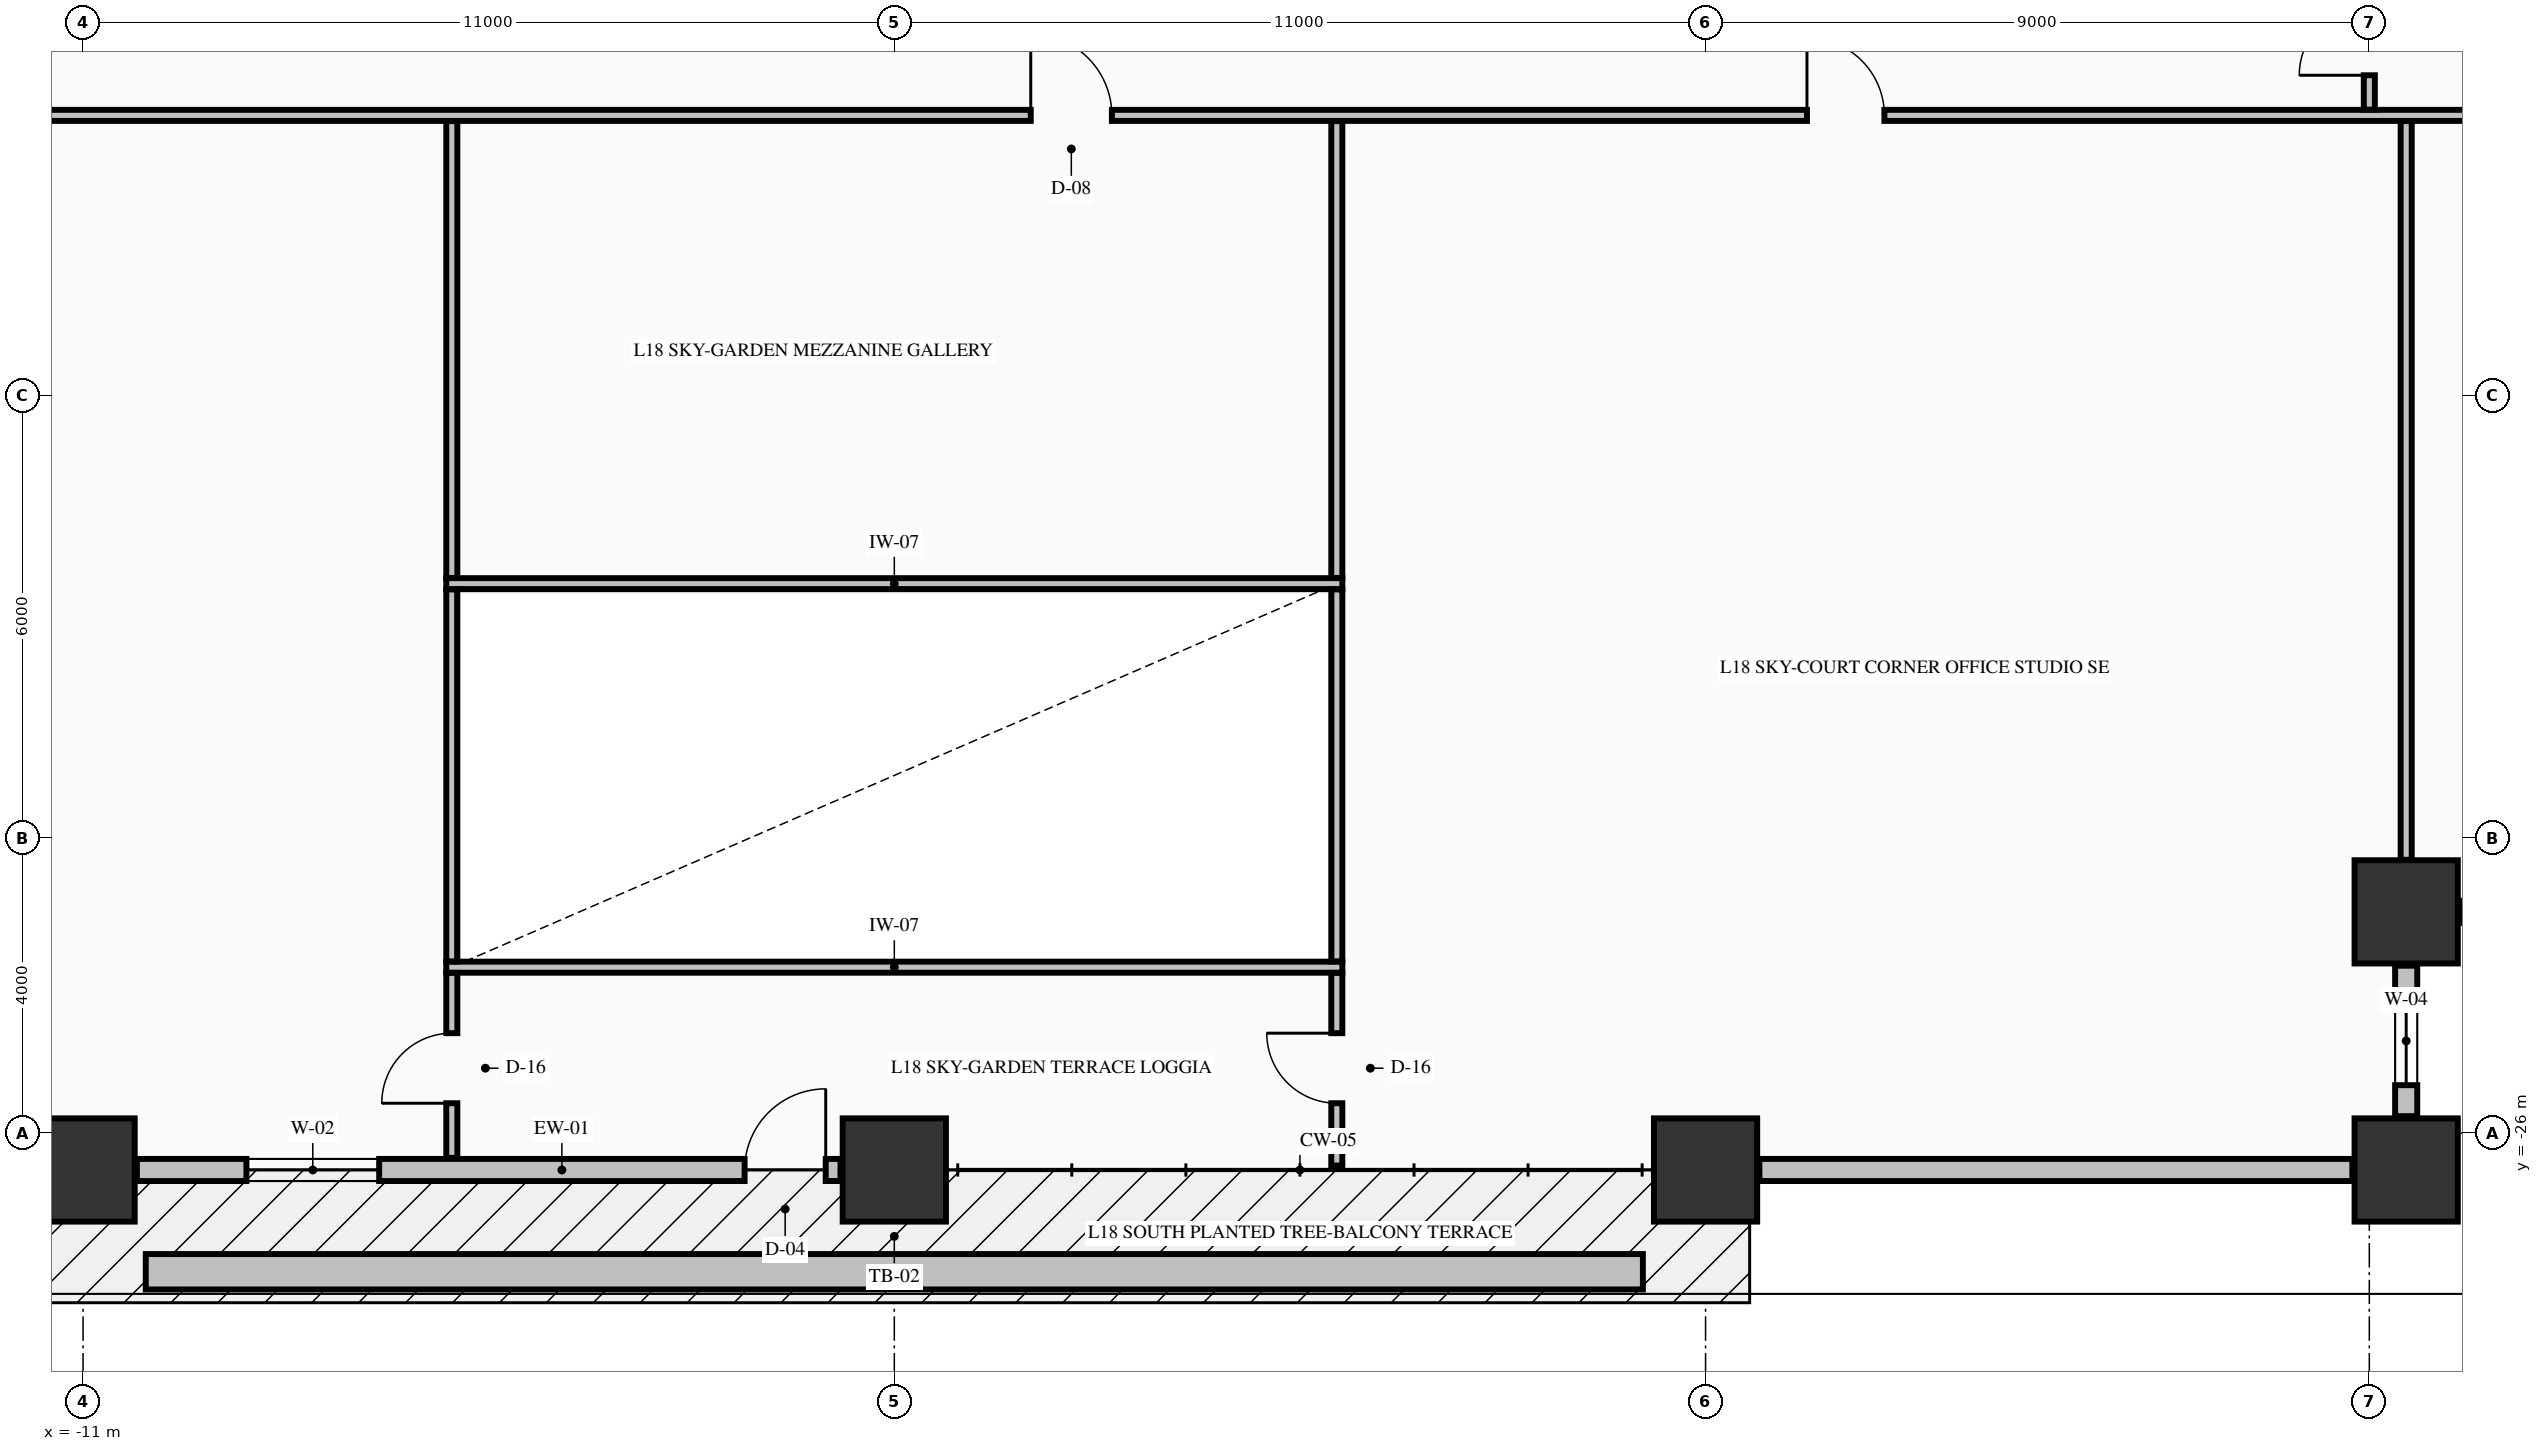
"""IFC4 building model, lengths in metres.
Left out: names, types, materials, properties, quantities, classifications, styles, units other than length and angle.
Written with IfcOpenShell. Run it as: python <this file> out.ifc"""

import sys

from ifc_helpers import new_model, si_unit, direction, frame, frame_2d, origin, origin_2d, place, context, subcontext, project, spatial, rectangle, extrude, element, fill, save


model = new_model("IFC4")
c1 = context("Model", 3, precision=1e-05, world=origin(), true_north=direction((0.0, 1.0)))
c2 = subcontext(c1, "Body", "Model", "MODEL_VIEW")
j1 = project(units=[si_unit("LENGTHUNIT", "METRE"), si_unit("PLANEANGLEUNIT", "RADIAN")], contexts=[c1])
p1 = place(None, origin())
s1 = spatial("IfcSite", under=j1, at=p1, CompositionType="ELEMENT")
p2 = place(p1, origin())
s2 = spatial("IfcBuilding", under=s1, at=p2, CompositionType="ELEMENT")
p3 = place(p2, frame((0.0, 0.0, 75.04)))
s3 = spatial("IfcBuildingStorey", under=s2, at=p3, CompositionType="ELEMENT", Elevation=75.04)
for number, where, z_axis, x_axis in (
    (1, (-11.0, -26.5, -0.25), (0.0, 0.0, 1.0), (1.0, 0.0, 0.0)),
    (2, (0.0, -26.5, -0.25), (0.0, 0.0, 1.0), (1.0, 0.0, 0.0)),
    (3, (11.0, -26.5, -0.25), (0.0, 0.0, 1.0), (1.0, 0.0, 0.0)),
    (4, (20.5, -26.5, -0.25), (0.0, 0.0, 1.0), (1.0, 0.0, 0.0)),
    (5, (20.5, -23.0, -0.25), (0.0, 0.0, 1.0), (1.0, 0.0, 0.0)),
):
    element("IfcColumn", number, at=place(p3, frame(where, z_axis=z_axis, x_axis=x_axis)), inside=s3, PredefinedType="COLUMN", context=c2, shape_type="SweptSolid", body=[
        extrude(rectangle(XDim=1.4, YDim=1.4, at=origin_2d()), origin(), (0.0, 0.0, 1.0), 3.57),
    ])
p4 = place(p3, frame((20.5, -25.77, 0.0), z_axis=(0.0, 0.0, 1.0), x_axis=(0.0, 1.0, 0.0)))
e6 = element("IfcWall", 6, at=p4, inside=s3, PredefinedType="STANDARD", context=c2, shape_type="SweptSolid", body=[
    extrude(rectangle(XDim=2.04, YDim=0.3, at=frame_2d((1.02, 0.0))), origin(), (0.0, 0.0, 1.0), 2.712),
])
p5 = place(p4, frame((0.42, 0.0, 0.82)))
e7 = element("IfcOpeningElement", 7, at=p5, cuts=e6, PredefinedType="OPENING", context=c2, shape_type="SweptSolid", body=[
    extrude(rectangle(XDim=1.2, YDim=1.65, at=frame_2d((0.6, 0.825))), frame((0.0, 0.16, 0.0), z_axis=(0.0, -1.0, 0.0), x_axis=(1.0, 0.0, 0.0)), (0.0, 0.0, 1.0), 0.32),
])
p6 = place(p3, frame((21.23, -23.0, 0.0), z_axis=(0.0, 0.0, 1.0), x_axis=(1.0, 0.0, 0.0)))
e8 = element("IfcWall", 8, at=p6, inside=s3, PredefinedType="STANDARD", context=c2, shape_type="SweptSolid", body=[
    extrude(rectangle(XDim=2.04, YDim=0.3, at=frame_2d((1.02, 0.0))), origin(), (0.0, 0.0, 1.0), 2.712),
])
p7 = place(p6, frame((0.42, 0.0, 0.82)))
e9 = element("IfcOpeningElement", 9, at=p7, cuts=e8, PredefinedType="OPENING", context=c2, shape_type="SweptSolid", body=[
    extrude(rectangle(XDim=1.2, YDim=1.65, at=frame_2d((0.6, 0.825))), frame((0.0, 0.16, 0.0), z_axis=(0.0, -1.0, 0.0), x_axis=(1.0, 0.0, 0.0)), (0.0, 0.0, 1.0), 0.32),
])
p8 = place(p3, frame((-10.27, -26.5, 0.0), z_axis=(0.0, 0.0, 1.0), x_axis=(1.0, 0.0, 0.0)))
e10 = element("IfcWall", 10, at=p8, inside=s3, PredefinedType="STANDARD", context=c2, shape_type="SweptSolid", body=[
    extrude(rectangle(XDim=9.54, YDim=0.3, at=frame_2d((4.77, 0.0))), origin(), (0.0, 0.0, 1.0), 2.712),
])
p9 = place(p8, frame((8.24, 0.0, 0.0)))
e11 = element("IfcOpeningElement", 11, at=p9, cuts=e10, PredefinedType="OPENING", context=c2, shape_type="SweptSolid", body=[
    extrude(rectangle(XDim=1.1, YDim=2.15, at=frame_2d((0.55, 1.075))), frame((0.0, 0.16, 0.0), z_axis=(0.0, -1.0, 0.0), x_axis=(1.0, 0.0, 0.0)), (0.0, 0.0, 1.0), 0.32),
])
p10 = place(p8, frame((1.485, 0.0, 0.78)))
e12 = element("IfcOpeningElement", 12, at=p10, cuts=e10, PredefinedType="OPENING", context=c2, shape_type="SweptSolid", body=[
    extrude(rectangle(XDim=1.8, YDim=1.72, at=frame_2d((0.9, 0.86))), frame((0.0, 0.16, 0.0), z_axis=(0.0, -1.0, 0.0), x_axis=(1.0, 0.0, 0.0)), (0.0, 0.0, 1.0), 0.32),
])
p11 = place(p3, frame((11.73, -26.5, 0.0), z_axis=(0.0, 0.0, 1.0), x_axis=(1.0, 0.0, 0.0)))
e13 = element("IfcWall", 13, at=p11, inside=s3, PredefinedType="STANDARD", context=c2, shape_type="SweptSolid", body=[
    extrude(rectangle(XDim=8.04, YDim=0.3, at=frame_2d((4.02, 0.0))), origin(), (0.0, 0.0, 1.0), 2.712),
])
for number, where, z_axis, x_axis in (
    (14, (-6.075, -23.75, 0.0), (0.0, 0.0, 1.0), (1.0, 0.0, 0.0)),
    (15, (-6.075, -18.55, 0.0), (0.0, 0.0, 1.0), (1.0, 0.0, 0.0)),
):
    element("IfcWall", number, at=place(p3, frame(where, z_axis=z_axis, x_axis=x_axis)), inside=s3, PredefinedType="PARTITIONING", context=c2, shape_type="SweptSolid", body=[
        extrude(rectangle(XDim=12.15, YDim=0.15, at=frame_2d((6.075, 0.0))), origin(), (0.0, 0.0, 1.0), 3.32),
    ])
p12 = place(p3, frame((-28.835, -12.2, 0.0), z_axis=(0.0, 0.0, 1.0), x_axis=(1.0, 0.0, 0.0)))
e16 = element("IfcWall", 16, at=p12, inside=s3, PredefinedType="PARTITIONING", context=c2, shape_type="SweptSolid", body=[
    extrude(rectangle(XDim=52.67, YDim=0.15, at=frame_2d((26.335, 0.0))), origin(), (0.0, 0.0, 1.0), 3.32),
])
p13 = place(p12, frame((30.685, 0.0, 0.0)))
e17 = element("IfcOpeningElement", 17, at=p13, cuts=e16, PredefinedType="OPENING", context=c2, shape_type="SweptSolid", body=[
    extrude(rectangle(XDim=1.1, YDim=2.15, at=frame_2d((0.55, 1.075))), frame((0.0, 0.085, 0.0), z_axis=(0.0, -1.0, 0.0), x_axis=(1.0, 0.0, 0.0)), (0.0, 0.0, 1.0), 0.17),
])
p14 = place(p12, frame((15.41, 0.0, 0.0)))
e18 = element("IfcOpeningElement", 18, at=p14, cuts=e16, PredefinedType="OPENING", context=c2, shape_type="SweptSolid", body=[
    extrude(rectangle(XDim=1.05, YDim=2.15, at=frame_2d((0.525, 1.075))), frame((0.0, 0.085, 0.0), z_axis=(0.0, -1.0, 0.0), x_axis=(1.0, 0.0, 0.0)), (0.0, 0.0, 1.0), 0.17),
])
p15 = place(p12, frame((41.21, 0.0, 0.0)))
e19 = element("IfcOpeningElement", 19, at=p15, cuts=e16, PredefinedType="OPENING", context=c2, shape_type="SweptSolid", body=[
    extrude(rectangle(XDim=1.05, YDim=2.15, at=frame_2d((0.525, 1.075))), frame((0.0, 0.085, 0.0), z_axis=(0.0, -1.0, 0.0), x_axis=(1.0, 0.0, 0.0)), (0.0, 0.0, 1.0), 0.17),
])
p16 = place(p3, frame((-6.0, -26.335, 0.0), z_axis=(0.0, 0.0, 1.0), x_axis=(0.0, 1.0, 0.0)))
e20 = element("IfcWall", 20, at=p16, inside=s3, PredefinedType="PARTITIONING", context=c2, shape_type="SweptSolid", body=[
    extrude(rectangle(XDim=2.507, YDim=0.15, at=frame_2d((1.253, 0.0))), origin(), (0.0, 0.0, 1.0), 3.32),
])
p17 = place(p16, frame((0.74, 0.0, 0.0)))
e21 = element("IfcOpeningElement", 21, at=p17, cuts=e20, PredefinedType="OPENING", context=c2, shape_type="SweptSolid", body=[
    extrude(rectangle(XDim=0.95, YDim=2.15, at=frame_2d((0.475, 1.075))), frame((0.0, 0.085, 0.0), z_axis=(0.0, -1.0, 0.0), x_axis=(1.0, 0.0, 0.0)), (0.0, 0.0, 1.0), 0.17),
])
p18 = place(p3, frame((-6.0, -23.672, 0.0), z_axis=(0.0, 0.0, 1.0), x_axis=(0.0, 1.0, 0.0)))
e22 = element("IfcWall", 22, at=p18, inside=s3, PredefinedType="PARTITIONING", context=c2, shape_type="SweptSolid", body=[
    extrude(rectangle(XDim=5.044, YDim=0.15, at=frame_2d((2.522, 0.0))), origin(), (0.0, 0.0, 1.0), 3.32),
])
p19 = place(p3, frame((-6.0, -18.472, 0.0), z_axis=(0.0, 0.0, 1.0), x_axis=(0.0, 1.0, 0.0)))
e23 = element("IfcWall", 23, at=p19, inside=s3, PredefinedType="PARTITIONING", context=c2, shape_type="SweptSolid", body=[
    extrude(rectangle(XDim=6.194, YDim=0.15, at=frame_2d((3.097, 0.0))), origin(), (0.0, 0.0, 1.0), 3.32),
])
p20 = place(p3, frame((6.0, -26.44, 0.0), z_axis=(0.0, 0.0, 1.0), x_axis=(0.0, 1.0, 0.0)))
e24 = element("IfcWall", 24, at=p20, inside=s3, PredefinedType="PARTITIONING", context=c2, shape_type="SweptSolid", body=[
    extrude(rectangle(XDim=2.612, YDim=0.15, at=frame_2d((1.306, 0.0))), origin(), (0.0, 0.0, 1.0), 3.32),
])
p21 = place(p20, frame((0.845, 0.0, 0.0)))
e25 = element("IfcOpeningElement", 25, at=p21, cuts=e24, PredefinedType="OPENING", context=c2, shape_type="SweptSolid", body=[
    extrude(rectangle(XDim=0.95, YDim=2.15, at=frame_2d((0.475, 1.075))), frame((0.0, 0.085, 0.0), z_axis=(0.0, -1.0, 0.0), x_axis=(1.0, 0.0, 0.0)), (0.0, 0.0, 1.0), 0.17),
])
p22 = place(p3, frame((6.0, -23.672, 0.0), z_axis=(0.0, 0.0, 1.0), x_axis=(0.0, 1.0, 0.0)))
e26 = element("IfcWall", 26, at=p22, inside=s3, PredefinedType="PARTITIONING", context=c2, shape_type="SweptSolid", body=[
    extrude(rectangle(XDim=5.044, YDim=0.15, at=frame_2d((2.522, 0.0))), origin(), (0.0, 0.0, 1.0), 3.32),
])
p23 = place(p3, frame((6.0, -18.472, 0.0), z_axis=(0.0, 0.0, 1.0), x_axis=(0.0, 1.0, 0.0)))
e27 = element("IfcWall", 27, at=p23, inside=s3, PredefinedType="PARTITIONING", context=c2, shape_type="SweptSolid", body=[
    extrude(rectangle(XDim=6.194, YDim=0.15, at=frame_2d((3.097, 0.0))), origin(), (0.0, 0.0, 1.0), 3.32),
])
p24 = place(p3, frame((20.0, -12.122, 0.0), z_axis=(0.0, 0.0, 1.0), x_axis=(0.0, 1.0, 0.0)))
e28 = element("IfcWall", 28, at=p24, inside=s3, PredefinedType="PARTITIONING", context=c2, shape_type="SweptSolid", body=[
    extrude(rectangle(XDim=1.566, YDim=0.15, at=frame_2d((0.783, 0.0))), origin(), (0.0, 0.0, 1.0), 3.32),
])
p25 = place(p24, frame((0.466, 0.0, 0.0)))
e29 = element("IfcOpeningElement", 29, at=p25, cuts=e28, PredefinedType="OPENING", context=c2, shape_type="SweptSolid", body=[
    extrude(rectangle(XDim=0.95, YDim=2.15, at=frame_2d((0.475, 1.075))), frame((0.0, 0.085, 0.0), z_axis=(0.0, -1.0, 0.0), x_axis=(1.0, 0.0, 0.0)), (0.0, 0.0, 1.0), 0.17),
])
p26 = place(p3, frame((20.5, -22.294, 0.0), z_axis=(0.0, 0.0, 1.0), x_axis=(0.0, 1.0, 0.0)))
e30 = element("IfcWall", 30, at=p26, inside=s3, PredefinedType="PARTITIONING", context=c2, shape_type="SweptSolid", body=[
    extrude(rectangle(XDim=10.016, YDim=0.15, at=frame_2d((5.008, 0.0))), origin(), (0.0, 0.0, 1.0), 3.32),
])
p27 = place(p3, frame((-10.15, -27.88, -0.04), z_axis=(0.0, 0.0, 1.0), x_axis=(1.0, 0.0, 0.0)))
e31 = element("IfcWall", 31, at=p27, inside=s3, PredefinedType="PARAPET", context=c2, shape_type="SweptSolid", body=[
    extrude(rectangle(XDim=20.3, YDim=0.48, at=frame_2d((10.15, 0.0))), origin(), (0.0, 0.0, 1.0), 0.52),
])
p28 = place(p5, origin())
e32 = element("IfcWindow", 32, at=p28, inside=s3, PartitioningType="SINGLE_PANEL", PredefinedType="WINDOW", context=c2, shape_type="SweptSolid", body=[
    extrude(rectangle(XDim=1.2, YDim=1.65, at=frame_2d((0.6, 0.825))), frame((0.0, 0.03, 0.0), z_axis=(0.0, -1.0, 0.0), x_axis=(1.0, 0.0, 0.0)), (0.0, 0.0, 1.0), 0.06),
])
fill(e7, e32)
p29 = place(p9, origin())
e33 = element("IfcDoor", 33, at=p29, inside=s3, OperationType="SINGLE_SWING_RIGHT", PredefinedType="DOOR", context=c2, shape_type="SweptSolid", body=[
    extrude(rectangle(XDim=1.1, YDim=2.15, at=frame_2d((0.55, 1.075))), frame((0.0, 0.025, 0.0), z_axis=(0.0, -1.0, 0.0), x_axis=(1.0, 0.0, 0.0)), (0.0, 0.0, 1.0), 0.05),
])
fill(e11, e33)
p30 = place(p10, origin())
e34 = element("IfcWindow", 34, at=p30, inside=s3, PartitioningType="SINGLE_PANEL", PredefinedType="WINDOW", context=c2, shape_type="SweptSolid", body=[
    extrude(rectangle(XDim=1.8, YDim=1.72, at=frame_2d((0.9, 0.86))), frame((0.0, 0.03, 0.0), z_axis=(0.0, -1.0, 0.0), x_axis=(1.0, 0.0, 0.0)), (0.0, 0.0, 1.0), 0.06),
])
fill(e12, e34)
p31 = place(p17, origin())
e35 = element("IfcDoor", 35, at=p31, inside=s3, OperationType="SINGLE_SWING_LEFT", PredefinedType="DOOR", context=c2, shape_type="SweptSolid", body=[
    extrude(rectangle(XDim=0.95, YDim=2.15, at=frame_2d((0.475, 1.075))), frame((0.0, 0.025, 0.0), z_axis=(0.0, -1.0, 0.0), x_axis=(1.0, 0.0, 0.0)), (0.0, 0.0, 1.0), 0.05),
])
fill(e21, e35)
p32 = place(p21, origin())
e36 = element("IfcDoor", 36, at=p32, inside=s3, OperationType="SINGLE_SWING_RIGHT", PredefinedType="DOOR", context=c2, shape_type="SweptSolid", body=[
    extrude(rectangle(XDim=0.95, YDim=2.15, at=frame_2d((0.475, 1.075))), frame((0.0, 0.025, 0.0), z_axis=(0.0, -1.0, 0.0), x_axis=(1.0, 0.0, 0.0)), (0.0, 0.0, 1.0), 0.05),
])
fill(e25, e36)
p33 = place(p13, origin())
e37 = element("IfcDoor", 37, at=p33, inside=s3, OperationType="SINGLE_SWING_LEFT", PredefinedType="DOOR", context=c2, shape_type="SweptSolid", body=[
    extrude(rectangle(XDim=1.1, YDim=2.15, at=frame_2d((0.55, 1.075))), frame((0.0, 0.025, 0.0), z_axis=(0.0, -1.0, 0.0), x_axis=(1.0, 0.0, 0.0)), (0.0, 0.0, 1.0), 0.05),
])
fill(e17, e37)
p34 = place(p15, origin())
e38 = element("IfcDoor", 38, at=p34, inside=s3, OperationType="SINGLE_SWING_LEFT", PredefinedType="DOOR", context=c2, shape_type="SweptSolid", body=[
    extrude(rectangle(XDim=1.05, YDim=2.15, at=frame_2d((0.525, 1.075))), frame((0.0, 0.025, 0.0), z_axis=(0.0, -1.0, 0.0), x_axis=(1.0, 0.0, 0.0)), (0.0, 0.0, 1.0), 0.05),
])
fill(e19, e38)
p35 = place(p25, origin())
e39 = element("IfcDoor", 39, at=p35, inside=s3, OperationType="SINGLE_SWING_LEFT", PredefinedType="DOOR", context=c2, shape_type="SweptSolid", body=[
    extrude(rectangle(XDim=0.95, YDim=2.15, at=frame_2d((0.475, 1.075))), frame((0.0, 0.025, 0.0), z_axis=(0.0, -1.0, 0.0), x_axis=(1.0, 0.0, 0.0)), (0.0, 0.0, 1.0), 0.05),
])
fill(e29, e39)
save(model, sys.argv[1])
